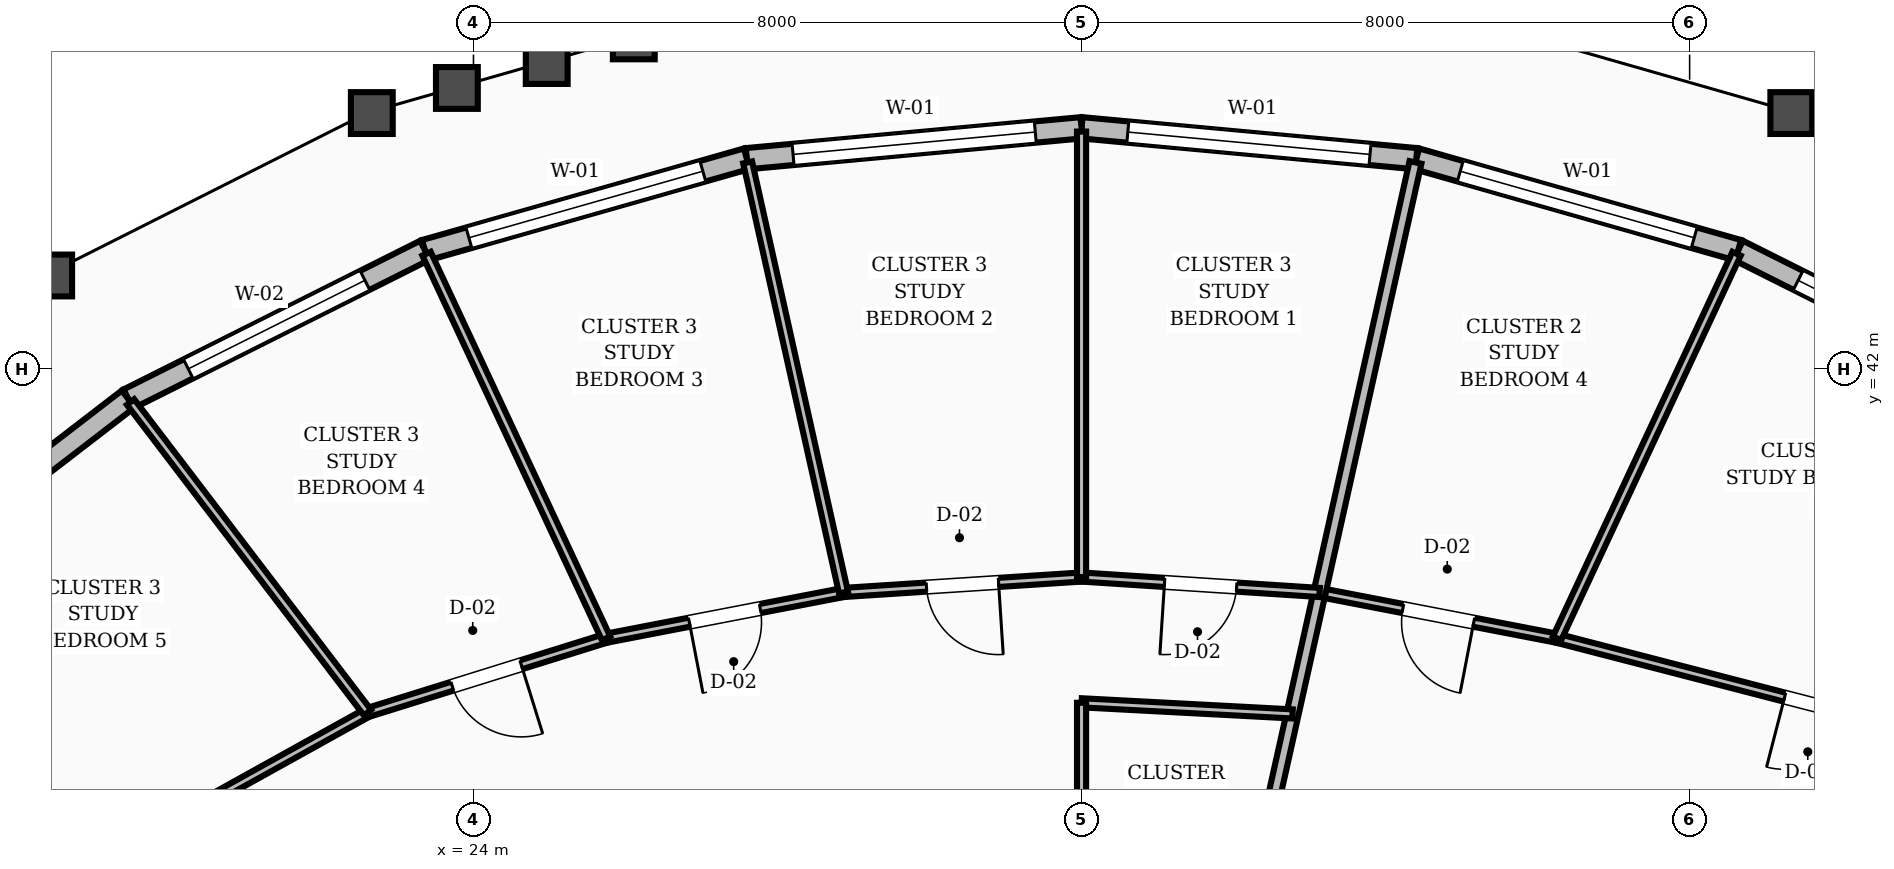
"""IFC4 building model, lengths in metres.
Left out: names, types, materials, properties, quantities, classifications, styles, units other than length and angle.
Written with IfcOpenShell. Run it as: python <this file> out.ifc"""

import sys

from ifc_helpers import new_model, si_unit, direction, frame, frame_2d, origin, place, context, subcontext, project, spatial, rectangle, extrude, element, fill, save


model = new_model("IFC4")
c1 = context("Model", 3, precision=1e-05, world=origin(), true_north=direction((0.0, 1.0)))
c2 = subcontext(c1, "Body", "Model", "MODEL_VIEW")
j1 = project(units=[si_unit("LENGTHUNIT", "METRE"), si_unit("PLANEANGLEUNIT", "RADIAN")], contexts=[c1])
p1 = place(None, origin())
s1 = spatial("IfcSite", under=j1, at=p1, CompositionType="ELEMENT")
p2 = place(p1, origin())
s2 = spatial("IfcBuilding", under=s1, at=p2, CompositionType="ELEMENT")
p3 = place(p2, frame((0.0, 0.0, 229.2)))
s3 = spatial("IfcBuildingStorey", under=s2, at=p3, CompositionType="ELEMENT", Elevation=229.2)
p4 = place(p3, frame((44.542, 41.603, 0.0), z_axis=(0.0, 0.0, 1.0), x_axis=(-0.893979362311, 0.448108134005, 0.0)))
e1 = element("IfcWall", 1, at=p4, inside=s3, PredefinedType="STANDARD", context=c2, shape_type="SweptSolid", body=[
    extrude(rectangle(XDim=4.366, YDim=0.28, at=frame_2d((2.183, 0.0))), origin(), (0.0, 0.0, 1.0), 2.88),
])
p5 = place(p4, frame((0.883, 0.0, 0.8)))
e2 = element("IfcOpeningElement", 2, at=p5, cuts=e1, PredefinedType="OPENING", context=c2, shape_type="SweptSolid", body=[
    extrude(rectangle(XDim=2.6, YDim=1.65, at=frame_2d((1.3, 0.825))), frame((0.0, 0.15, 0.0), z_axis=(0.0, -1.0, 0.0), x_axis=(1.0, 0.0, 0.0)), (0.0, 0.0, 1.0), 0.3),
])
p6 = place(p3, frame((40.639, 43.559, 0.0), z_axis=(0.0, 0.0, 1.0), x_axis=(-0.961841376219, 0.27360768811, 0.0)))
e3 = element("IfcWall", 3, at=p6, inside=s3, PredefinedType="STANDARD", context=c2, shape_type="SweptSolid", body=[
    extrude(rectangle(XDim=4.403, YDim=0.28, at=frame_2d((2.201, 0.0))), origin(), (0.0, 0.0, 1.0), 2.88),
])
p7 = place(p6, frame((0.601, 0.0, 0.8)))
e4 = element("IfcOpeningElement", 4, at=p7, cuts=e3, PredefinedType="OPENING", context=c2, shape_type="SweptSolid", body=[
    extrude(rectangle(XDim=3.2, YDim=1.65, at=frame_2d((1.6, 0.825))), frame((0.0, 0.15, 0.0), z_axis=(0.0, -1.0, 0.0), x_axis=(1.0, 0.0, 0.0)), (0.0, 0.0, 1.0), 0.3),
])
p8 = place(p3, frame((36.404, 44.763, 0.0), z_axis=(0.0, 0.0, 1.0), x_axis=(-0.995757268647, 0.092018812952, 0.0)))
e5 = element("IfcWall", 5, at=p8, inside=s3, PredefinedType="STANDARD", context=c2, shape_type="SweptSolid", body=[
    extrude(rectangle(XDim=4.423, YDim=0.28, at=frame_2d((2.211, 0.0))), origin(), (0.0, 0.0, 1.0), 2.88),
])
p9 = place(p8, frame((0.611, 0.0, 0.8)))
e6 = element("IfcOpeningElement", 6, at=p9, cuts=e5, PredefinedType="OPENING", context=c2, shape_type="SweptSolid", body=[
    extrude(rectangle(XDim=3.2, YDim=1.65, at=frame_2d((1.6, 0.825))), frame((0.0, 0.15, 0.0), z_axis=(0.0, -1.0, 0.0), x_axis=(1.0, 0.0, 0.0)), (0.0, 0.0, 1.0), 0.3),
])
p10 = place(p3, frame((32.0, 45.17, 0.0), z_axis=(0.0, 0.0, 1.0), x_axis=(-0.995757268647, -0.092018812952, 0.0)))
e7 = element("IfcWall", 7, at=p10, inside=s3, PredefinedType="STANDARD", context=c2, shape_type="SweptSolid", body=[
    extrude(rectangle(XDim=4.423, YDim=0.28, at=frame_2d((2.211, 0.0))), origin(), (0.0, 0.0, 1.0), 2.88),
])
p11 = place(p10, frame((0.611, 0.0, 0.8)))
e8 = element("IfcOpeningElement", 8, at=p11, cuts=e7, PredefinedType="OPENING", context=c2, shape_type="SweptSolid", body=[
    extrude(rectangle(XDim=3.2, YDim=1.65, at=frame_2d((1.6, 0.825))), frame((0.0, 0.15, 0.0), z_axis=(0.0, -1.0, 0.0), x_axis=(1.0, 0.0, 0.0)), (0.0, 0.0, 1.0), 0.3),
])
p12 = place(p3, frame((27.596, 44.763, 0.0), z_axis=(0.0, 0.0, 1.0), x_axis=(-0.961841376219, -0.27360768811, 0.0)))
e9 = element("IfcWall", 9, at=p12, inside=s3, PredefinedType="STANDARD", context=c2, shape_type="SweptSolid", body=[
    extrude(rectangle(XDim=4.403, YDim=0.28, at=frame_2d((2.201, 0.0))), origin(), (0.0, 0.0, 1.0), 2.88),
])
p13 = place(p12, frame((0.601, 0.0, 0.8)))
e10 = element("IfcOpeningElement", 10, at=p13, cuts=e9, PredefinedType="OPENING", context=c2, shape_type="SweptSolid", body=[
    extrude(rectangle(XDim=3.2, YDim=1.65, at=frame_2d((1.6, 0.825))), frame((0.0, 0.15, 0.0), z_axis=(0.0, -1.0, 0.0), x_axis=(1.0, 0.0, 0.0)), (0.0, 0.0, 1.0), 0.3),
])
p14 = place(p3, frame((23.361, 43.559, 0.0), z_axis=(0.0, 0.0, 1.0), x_axis=(-0.893979362311, -0.448108134005, 0.0)))
e11 = element("IfcWall", 11, at=p14, inside=s3, PredefinedType="STANDARD", context=c2, shape_type="SweptSolid", body=[
    extrude(rectangle(XDim=4.366, YDim=0.28, at=frame_2d((2.183, 0.0))), origin(), (0.0, 0.0, 1.0), 2.88),
])
p15 = place(p14, frame((0.883, 0.0, 0.8)))
e12 = element("IfcOpeningElement", 12, at=p15, cuts=e11, PredefinedType="OPENING", context=c2, shape_type="SweptSolid", body=[
    extrude(rectangle(XDim=2.6, YDim=1.65, at=frame_2d((1.3, 0.825))), frame((0.0, 0.15, 0.0), z_axis=(0.0, -1.0, 0.0), x_axis=(1.0, 0.0, 0.0)), (0.0, 0.0, 1.0), 0.3),
])
p16 = place(p3, frame((19.458, 41.603, 0.0), z_axis=(0.0, 0.0, 1.0), x_axis=(-0.792451546341, -0.609934870869, 0.0)))
e13 = element("IfcWall", 13, at=p16, inside=s3, PredefinedType="STANDARD", context=c2, shape_type="SweptSolid", body=[
    extrude(rectangle(XDim=4.317, YDim=0.28, at=frame_2d((2.158, 0.0))), origin(), (0.0, 0.0, 1.0), 2.88),
])
p17 = place(p3, frame((45.164, 36.667, 0.0), z_axis=(0.0, 0.0, 1.0), x_axis=(-0.968125457117, 0.250465764689, 0.0)))
e14 = element("IfcWall", 14, at=p17, inside=s3, PredefinedType="PARTITIONING", context=c2, shape_type="SweptSolid", body=[
    extrude(rectangle(XDim=7.135, YDim=0.12, at=frame_2d((3.568, 0.0))), origin(), (0.0, 0.0, 1.0), 2.87),
])
p18 = place(p17, frame((3.093, 0.0, 0.0)))
e15 = element("IfcOpeningElement", 15, at=p18, cuts=e14, PredefinedType="OPENING", context=c2, shape_type="SweptSolid", body=[
    extrude(rectangle(XDim=0.95, YDim=2.1, at=frame_2d((0.475, 1.05))), frame((0.0, 0.07, 0.0), z_axis=(0.0, -1.0, 0.0), x_axis=(1.0, 0.0, 0.0)), (0.0, 0.0, 1.0), 0.14),
])
p19 = place(p3, frame((38.256, 38.454, 0.0), z_axis=(0.0, 0.0, 1.0), x_axis=(-0.981903403817, 0.189382432059, 0.0)))
e16 = element("IfcWall", 16, at=p19, inside=s3, PredefinedType="PARTITIONING", context=c2, shape_type="SweptSolid", body=[
    extrude(rectangle(XDim=3.182, YDim=0.12, at=frame_2d((1.591, 0.0))), origin(), (0.0, 0.0, 1.0), 2.87),
])
p20 = place(p19, frame((1.116, 0.0, 0.0)))
e17 = element("IfcOpeningElement", 17, at=p20, cuts=e16, PredefinedType="OPENING", context=c2, shape_type="SweptSolid", body=[
    extrude(rectangle(XDim=0.95, YDim=2.1, at=frame_2d((0.475, 1.05))), frame((0.0, 0.07, 0.0), z_axis=(0.0, -1.0, 0.0), x_axis=(1.0, 0.0, 0.0)), (0.0, 0.0, 1.0), 0.14),
])
p21 = place(p3, frame((38.256, 38.454, 0.0), z_axis=(0.0, 0.0, 1.0), x_axis=(0.422983612083, 0.906137331705, 0.0)))
e18 = element("IfcWall", 18, at=p21, inside=s3, PredefinedType="PARTITIONING", context=c2, shape_type="SweptSolid", body=[
    extrude(rectangle(XDim=5.583, YDim=0.12, at=frame_2d((2.792, 0.0))), origin(), (0.0, 0.0, 1.0), 2.87),
])
p22 = place(p3, frame((33.86, 33.35, 0.0), z_axis=(0.0, 0.0, 1.0), x_axis=(0.217565376415, 0.976045750457, 0.0)))
e19 = element("IfcWall", 19, at=p22, inside=s3, PredefinedType="SOLIDWALL", context=c2, shape_type="SweptSolid", body=[
    extrude(rectangle(XDim=11.643, YDim=0.16, at=frame_2d((5.822, 0.0))), origin(), (0.0, 0.0, 1.0), 2.87),
])
p23 = place(p3, frame((34.776, 37.459, 0.0), z_axis=(0.0, 0.0, 1.0), x_axis=(-0.998614916088, 0.052614155575, 0.0)))
e20 = element("IfcWall", 20, at=p23, inside=s3, PredefinedType="PARTITIONING", context=c2, shape_type="SweptSolid", body=[
    extrude(rectangle(XDim=2.78, YDim=0.12, at=frame_2d((1.39, 0.0))), origin(), (0.0, 0.0, 1.0), 2.87),
])
p24 = place(p3, frame((32.0, 33.35, 0.0), z_axis=(0.0, 0.0, 1.0), x_axis=(0.0, 1.0, 0.0)))
e21 = element("IfcWall", 21, at=p24, inside=s3, PredefinedType="PARTITIONING", context=c2, shape_type="SweptSolid", body=[
    extrude(rectangle(XDim=4.255, YDim=0.12, at=frame_2d((2.127, 0.0))), origin(), (0.0, 0.0, 1.0), 2.87),
])
p25 = place(p24, frame((0.44, 0.0, 0.0)))
e22 = element("IfcOpeningElement", 22, at=p25, cuts=e21, PredefinedType="OPENING", context=c2, shape_type="SweptSolid", body=[
    extrude(rectangle(XDim=0.86, YDim=2.1, at=frame_2d((0.43, 1.05))), frame((0.0, 0.07, 0.0), z_axis=(0.0, -1.0, 0.0), x_axis=(1.0, 0.0, 0.0)), (0.0, 0.0, 1.0), 0.14),
])
p26 = place(p3, frame((35.132, 39.057, 0.0), z_axis=(0.0, 0.0, 1.0), x_axis=(-0.997903324505, 0.064722136419, 0.0)))
e23 = element("IfcWall", 23, at=p26, inside=s3, PredefinedType="PARTITIONING", context=c2, shape_type="SweptSolid", body=[
    extrude(rectangle(XDim=3.138, YDim=0.12, at=frame_2d((1.569, 0.0))), origin(), (0.0, 0.0, 1.0), 2.87),
])
p27 = place(p26, frame((1.094, 0.0, 0.0)))
e24 = element("IfcOpeningElement", 24, at=p27, cuts=e23, PredefinedType="OPENING", context=c2, shape_type="SweptSolid", body=[
    extrude(rectangle(XDim=0.95, YDim=2.1, at=frame_2d((0.475, 1.05))), frame((0.0, 0.07, 0.0), z_axis=(0.0, -1.0, 0.0), x_axis=(1.0, 0.0, 0.0)), (0.0, 0.0, 1.0), 0.14),
])
p28 = place(p3, frame((32.0, 39.26, 0.0), z_axis=(0.0, 0.0, 1.0), x_axis=(-0.997903324505, -0.064722136419, 0.0)))
e25 = element("IfcWall", 25, at=p28, inside=s3, PredefinedType="PARTITIONING", context=c2, shape_type="SweptSolid", body=[
    extrude(rectangle(XDim=3.138, YDim=0.12, at=frame_2d((1.569, 0.0))), origin(), (0.0, 0.0, 1.0), 2.87),
])
p29 = place(p28, frame((1.094, 0.0, 0.0)))
e26 = element("IfcOpeningElement", 26, at=p29, cuts=e25, PredefinedType="OPENING", context=c2, shape_type="SweptSolid", body=[
    extrude(rectangle(XDim=0.95, YDim=2.1, at=frame_2d((0.475, 1.05))), frame((0.0, 0.07, 0.0), z_axis=(0.0, -1.0, 0.0), x_axis=(1.0, 0.0, 0.0)), (0.0, 0.0, 1.0), 0.14),
])
p30 = place(p3, frame((32.0, 39.26, 0.0), z_axis=(0.0, 0.0, 1.0), x_axis=(0.0, 1.0, 0.0)))
e27 = element("IfcWall", 27, at=p30, inside=s3, PredefinedType="PARTITIONING", context=c2, shape_type="SweptSolid", body=[
    extrude(rectangle(XDim=5.86, YDim=0.12, at=frame_2d((2.93, 0.0))), origin(), (0.0, 0.0, 1.0), 2.87),
])
p31 = place(p3, frame((28.868, 39.057, 0.0), z_axis=(0.0, 0.0, 1.0), x_axis=(-0.981903403817, -0.189382432059, 0.0)))
e28 = element("IfcWall", 28, at=p31, inside=s3, PredefinedType="PARTITIONING", context=c2, shape_type="SweptSolid", body=[
    extrude(rectangle(XDim=3.182, YDim=0.12, at=frame_2d((1.591, 0.0))), origin(), (0.0, 0.0, 1.0), 2.87),
])
p32 = place(p31, frame((1.116, 0.0, 0.0)))
e29 = element("IfcOpeningElement", 29, at=p32, cuts=e28, PredefinedType="OPENING", context=c2, shape_type="SweptSolid", body=[
    extrude(rectangle(XDim=0.95, YDim=2.1, at=frame_2d((0.475, 1.05))), frame((0.0, 0.07, 0.0), z_axis=(0.0, -1.0, 0.0), x_axis=(1.0, 0.0, 0.0)), (0.0, 0.0, 1.0), 0.14),
])
p33 = place(p3, frame((28.868, 39.057, 0.0), z_axis=(0.0, 0.0, 1.0), x_axis=(-0.217581504045, 0.97604215539, 0.0)))
e30 = element("IfcWall", 30, at=p33, inside=s3, PredefinedType="PARTITIONING", context=c2, shape_type="SweptSolid", body=[
    extrude(rectangle(XDim=5.797, YDim=0.12, at=frame_2d((2.898, 0.0))), origin(), (0.0, 0.0, 1.0), 2.87),
])
p34 = place(p3, frame((25.744, 38.454, 0.0), z_axis=(0.0, 0.0, 1.0), x_axis=(-0.954716225697, -0.297517946335, 0.0)))
e31 = element("IfcWall", 31, at=p34, inside=s3, PredefinedType="PARTITIONING", context=c2, shape_type="SweptSolid", body=[
    extrude(rectangle(XDim=3.287, YDim=0.12, at=frame_2d((1.644, 0.0))), origin(), (0.0, 0.0, 1.0), 2.87),
])
p35 = place(p34, frame((1.169, 0.0, 0.0)))
e32 = element("IfcOpeningElement", 32, at=p35, cuts=e31, PredefinedType="OPENING", context=c2, shape_type="SweptSolid", body=[
    extrude(rectangle(XDim=0.95, YDim=2.1, at=frame_2d((0.475, 1.05))), frame((0.0, 0.07, 0.0), z_axis=(0.0, -1.0, 0.0), x_axis=(1.0, 0.0, 0.0)), (0.0, 0.0, 1.0), 0.14),
])
p36 = place(p3, frame((25.744, 38.454, 0.0), z_axis=(0.0, 0.0, 1.0), x_axis=(-0.422983612083, 0.906137331705, 0.0)))
e33 = element("IfcWall", 33, at=p36, inside=s3, PredefinedType="PARTITIONING", context=c2, shape_type="SweptSolid", body=[
    extrude(rectangle(XDim=5.583, YDim=0.12, at=frame_2d((2.792, 0.0))), origin(), (0.0, 0.0, 1.0), 2.87),
])
p37 = place(p3, frame((22.606, 37.476, 0.0), z_axis=(0.0, 0.0, 1.0), x_axis=(-0.87432114738, -0.485347845616, 0.0)))
e34 = element("IfcWall", 34, at=p37, inside=s3, PredefinedType="PARTITIONING", context=c2, shape_type="SweptSolid", body=[
    extrude(rectangle(XDim=7.096, YDim=0.12, at=frame_2d((3.548, 0.0))), origin(), (0.0, 0.0, 1.0), 2.87),
])
p38 = place(p37, frame((3.073, 0.0, 0.0)))
e35 = element("IfcOpeningElement", 35, at=p38, cuts=e34, PredefinedType="OPENING", context=c2, shape_type="SweptSolid", body=[
    extrude(rectangle(XDim=0.95, YDim=2.1, at=frame_2d((0.475, 1.05))), frame((0.0, 0.07, 0.0), z_axis=(0.0, -1.0, 0.0), x_axis=(1.0, 0.0, 0.0)), (0.0, 0.0, 1.0), 0.14),
])
p39 = place(p3, frame((22.606, 37.476, 0.0), z_axis=(0.0, 0.0, 1.0), x_axis=(-0.606441031296, 0.795128464816, 0.0)))
e36 = element("IfcWall", 36, at=p39, inside=s3, PredefinedType="PARTITIONING", context=c2, shape_type="SweptSolid", body=[
    extrude(rectangle(XDim=5.139, YDim=0.12, at=frame_2d((2.57, 0.0))), origin(), (0.0, 0.0, 1.0), 2.87),
])
p40 = place(p5, origin())
e37 = element("IfcWindow", 37, at=p40, inside=s3, PartitioningType="SINGLE_PANEL", PredefinedType="WINDOW", context=c2, shape_type="SweptSolid", body=[
    extrude(rectangle(XDim=2.6, YDim=1.65, at=frame_2d((1.3, 0.825))), frame((0.0, 0.03, 0.0), z_axis=(0.0, -1.0, 0.0), x_axis=(1.0, 0.0, 0.0)), (0.0, 0.0, 1.0), 0.06),
])
fill(e2, e37)
p41 = place(p7, origin())
e38 = element("IfcWindow", 38, at=p41, inside=s3, PartitioningType="SINGLE_PANEL", PredefinedType="WINDOW", context=c2, shape_type="SweptSolid", body=[
    extrude(rectangle(XDim=3.2, YDim=1.65, at=frame_2d((1.6, 0.825))), frame((0.0, 0.03, 0.0), z_axis=(0.0, -1.0, 0.0), x_axis=(1.0, 0.0, 0.0)), (0.0, 0.0, 1.0), 0.06),
])
fill(e4, e38)
p42 = place(p9, origin())
e39 = element("IfcWindow", 39, at=p42, inside=s3, PartitioningType="SINGLE_PANEL", PredefinedType="WINDOW", context=c2, shape_type="SweptSolid", body=[
    extrude(rectangle(XDim=3.2, YDim=1.65, at=frame_2d((1.6, 0.825))), frame((0.0, 0.03, 0.0), z_axis=(0.0, -1.0, 0.0), x_axis=(1.0, 0.0, 0.0)), (0.0, 0.0, 1.0), 0.06),
])
fill(e6, e39)
p43 = place(p11, origin())
e40 = element("IfcWindow", 40, at=p43, inside=s3, PartitioningType="SINGLE_PANEL", PredefinedType="WINDOW", context=c2, shape_type="SweptSolid", body=[
    extrude(rectangle(XDim=3.2, YDim=1.65, at=frame_2d((1.6, 0.825))), frame((0.0, 0.03, 0.0), z_axis=(0.0, -1.0, 0.0), x_axis=(1.0, 0.0, 0.0)), (0.0, 0.0, 1.0), 0.06),
])
fill(e8, e40)
p44 = place(p13, origin())
e41 = element("IfcWindow", 41, at=p44, inside=s3, PartitioningType="SINGLE_PANEL", PredefinedType="WINDOW", context=c2, shape_type="SweptSolid", body=[
    extrude(rectangle(XDim=3.2, YDim=1.65, at=frame_2d((1.6, 0.825))), frame((0.0, 0.03, 0.0), z_axis=(0.0, -1.0, 0.0), x_axis=(1.0, 0.0, 0.0)), (0.0, 0.0, 1.0), 0.06),
])
fill(e10, e41)
p45 = place(p15, origin())
e42 = element("IfcWindow", 42, at=p45, inside=s3, PartitioningType="SINGLE_PANEL", PredefinedType="WINDOW", context=c2, shape_type="SweptSolid", body=[
    extrude(rectangle(XDim=2.6, YDim=1.65, at=frame_2d((1.3, 0.825))), frame((0.0, 0.03, 0.0), z_axis=(0.0, -1.0, 0.0), x_axis=(1.0, 0.0, 0.0)), (0.0, 0.0, 1.0), 0.06),
])
fill(e12, e42)
p46 = place(p18, origin())
e43 = element("IfcDoor", 43, at=p46, inside=s3, OperationType="SINGLE_SWING_RIGHT", PredefinedType="DOOR", context=c2, shape_type="SweptSolid", body=[
    extrude(rectangle(XDim=0.95, YDim=2.1, at=frame_2d((0.475, 1.05))), frame((0.0, 0.025, 0.0), z_axis=(0.0, -1.0, 0.0), x_axis=(1.0, 0.0, 0.0)), (0.0, 0.0, 1.0), 0.05),
])
fill(e15, e43)
p47 = place(p20, origin())
e44 = element("IfcDoor", 44, at=p47, inside=s3, OperationType="SINGLE_SWING_LEFT", PredefinedType="DOOR", context=c2, shape_type="SweptSolid", body=[
    extrude(rectangle(XDim=0.95, YDim=2.1, at=frame_2d((0.475, 1.05))), frame((0.0, 0.025, 0.0), z_axis=(0.0, -1.0, 0.0), x_axis=(1.0, 0.0, 0.0)), (0.0, 0.0, 1.0), 0.05),
])
fill(e17, e44)
p48 = place(p27, origin())
e45 = element("IfcDoor", 45, at=p48, inside=s3, OperationType="SINGLE_SWING_RIGHT", PredefinedType="DOOR", context=c2, shape_type="SweptSolid", body=[
    extrude(rectangle(XDim=0.95, YDim=2.1, at=frame_2d((0.475, 1.05))), frame((0.0, 0.025, 0.0), z_axis=(0.0, -1.0, 0.0), x_axis=(1.0, 0.0, 0.0)), (0.0, 0.0, 1.0), 0.05),
])
fill(e24, e45)
p49 = place(p29, origin())
e46 = element("IfcDoor", 46, at=p49, inside=s3, OperationType="SINGLE_SWING_LEFT", PredefinedType="DOOR", context=c2, shape_type="SweptSolid", body=[
    extrude(rectangle(XDim=0.95, YDim=2.1, at=frame_2d((0.475, 1.05))), frame((0.0, 0.025, 0.0), z_axis=(0.0, -1.0, 0.0), x_axis=(1.0, 0.0, 0.0)), (0.0, 0.0, 1.0), 0.05),
])
fill(e26, e46)
p50 = place(p32, origin())
e47 = element("IfcDoor", 47, at=p50, inside=s3, OperationType="SINGLE_SWING_RIGHT", PredefinedType="DOOR", context=c2, shape_type="SweptSolid", body=[
    extrude(rectangle(XDim=0.95, YDim=2.1, at=frame_2d((0.475, 1.05))), frame((0.0, 0.025, 0.0), z_axis=(0.0, -1.0, 0.0), x_axis=(1.0, 0.0, 0.0)), (0.0, 0.0, 1.0), 0.05),
])
fill(e29, e47)
p51 = place(p35, origin())
e48 = element("IfcDoor", 48, at=p51, inside=s3, OperationType="SINGLE_SWING_LEFT", PredefinedType="DOOR", context=c2, shape_type="SweptSolid", body=[
    extrude(rectangle(XDim=0.95, YDim=2.1, at=frame_2d((0.475, 1.05))), frame((0.0, 0.025, 0.0), z_axis=(0.0, -1.0, 0.0), x_axis=(1.0, 0.0, 0.0)), (0.0, 0.0, 1.0), 0.05),
])
fill(e32, e48)
save(model, sys.argv[1])
